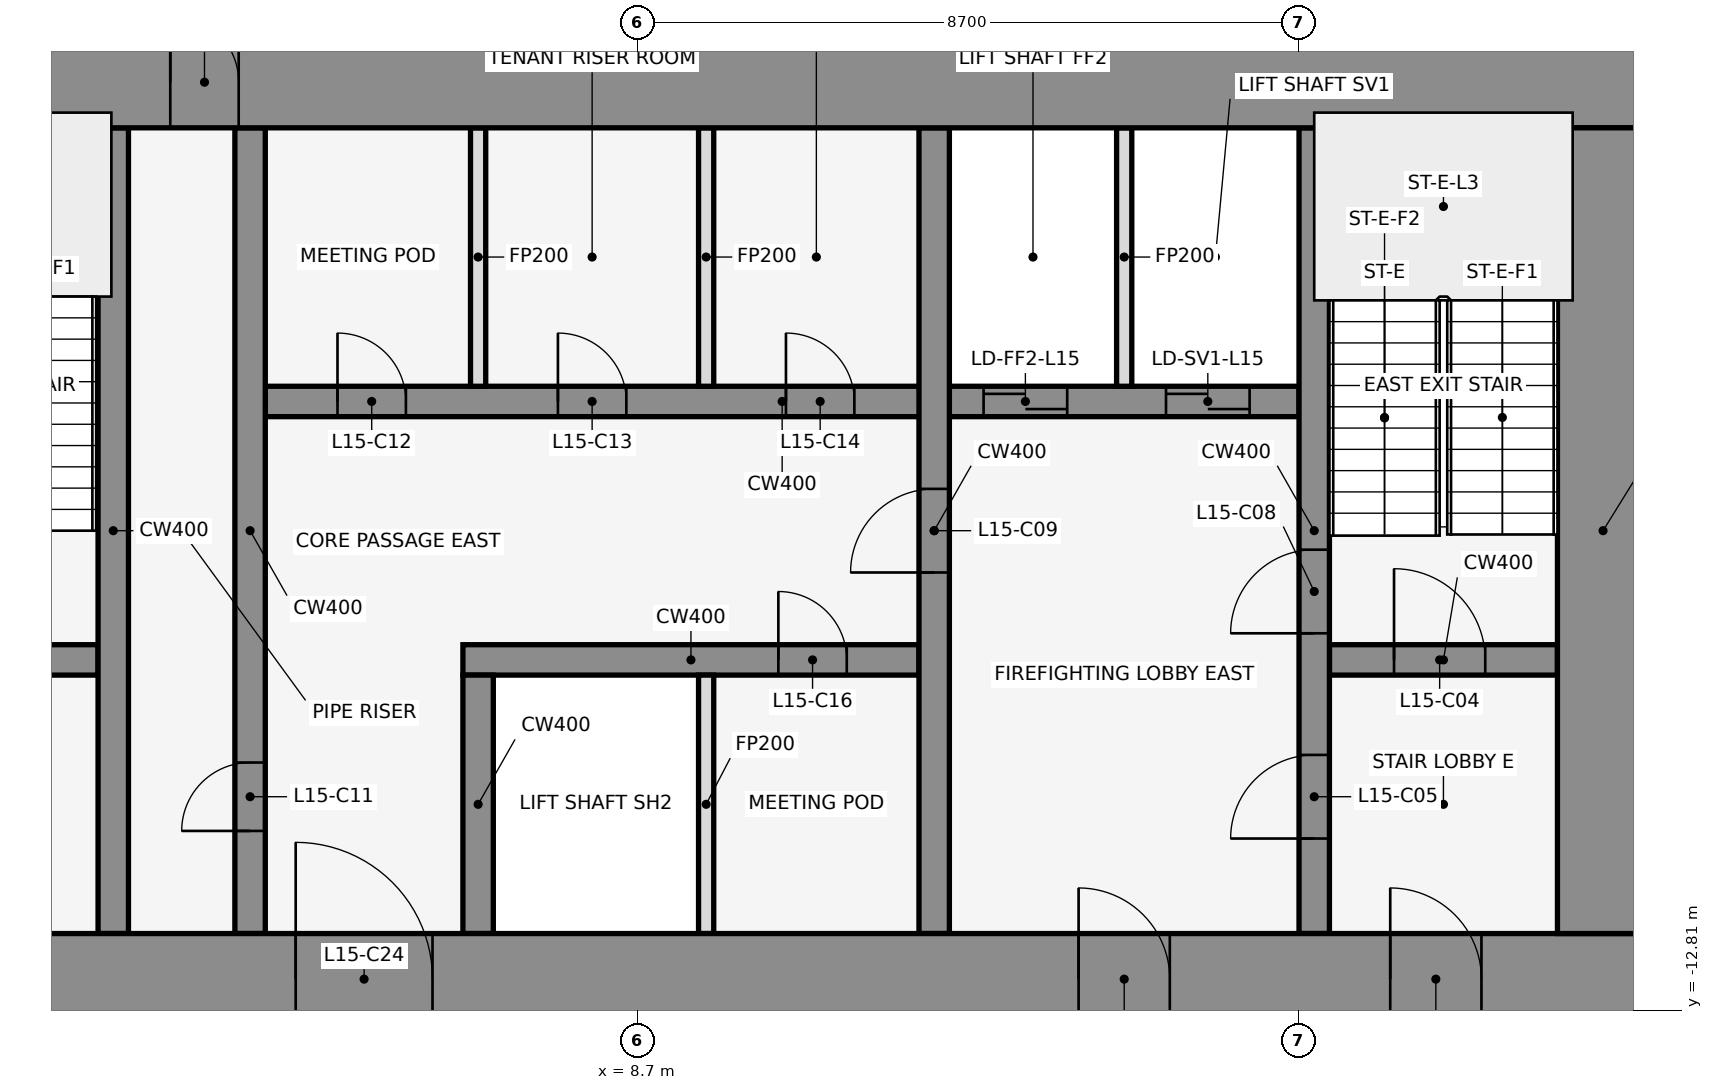
"""IFC4 building model, lengths in metres.
Left out: names, types, materials, properties, quantities, classifications, styles, units other than length and angle.
Written with IfcOpenShell. Run it as: python <this file> out.ifc"""

import sys

from ifc_helpers import new_model, si_unit, direction, frame, frame_2d, origin, place, context, subcontext, project, spatial, rectangle, extrude, element, fill, save


model = new_model("IFC4")
c1 = context("Model", 3, precision=1e-05, world=origin(), true_north=direction((0.0, 1.0)))
c2 = subcontext(c1, "Body", "Model", "MODEL_VIEW")
j1 = project(units=[si_unit("LENGTHUNIT", "METRE"), si_unit("PLANEANGLEUNIT", "RADIAN")], contexts=[c1])
p1 = place(None, origin())
s1 = spatial("IfcSite", under=j1, at=p1, CompositionType="ELEMENT")
p2 = place(p1, origin())
s2 = spatial("IfcBuilding", under=s1, at=p2, CompositionType="ELEMENT")
p3 = place(p2, frame((0.0, 0.0, 75.5)))
s3 = spatial("IfcBuildingStorey", under=s2, at=p3, CompositionType="ELEMENT", Elevation=75.5)
for number, where, z_axis, x_axis in (
    (1, (16.432, -0.105, 0.0), (0.0, 0.0, 1.0), (-0.84, 0.543, 0.0)),
    (2, (1.901, 1.08, 0.0), (0.0, 0.0, 1.0), (-0.84, -0.543, 0.0)),
):
    element("IfcWall", number, at=place(p3, frame(where, z_axis=z_axis, x_axis=x_axis)), inside=s3, PredefinedType="STANDARD", context=c2, shape_type="SweptSolid", body=[
        extrude(rectangle(XDim=2.183, YDim=0.25, at=frame_2d((1.091, 0.0))), origin(), (0.0, 0.0, 1.0), 4.35),
    ])
p4 = place(p3, frame((-1.6, -8.2, 0.0), z_axis=(0.0, 0.0, 1.0), x_axis=(1.0, 0.0, 0.0)))
e3 = element("IfcWall", 3, at=p4, inside=s3, PredefinedType="SHEAR", context=c2, shape_type="SweptSolid", body=[
    extrude(rectangle(XDim=3.2, YDim=0.4, at=frame_2d((1.6, 0.0))), origin(), (0.0, 0.0, 1.0), 4.5),
])
p5 = place(p4, frame((1.05, 0.0, 0.0)))
e4 = element("IfcOpeningElement", 4, at=p5, cuts=e3, PredefinedType="OPENING", context=c2, shape_type="SweptSolid", body=[
    extrude(rectangle(XDim=1.2, YDim=2.1, at=frame_2d((0.6, 1.05))), frame((0.0, 0.212, 0.0), z_axis=(0.0, -1.0, 0.0), x_axis=(1.0, 0.0, 0.0)), (0.0, 0.0, 1.0), 0.424),
])
p6 = place(p3, frame((6.4, -8.2, 0.0), z_axis=(0.0, 0.0, 1.0), x_axis=(1.0, 0.0, 0.0)))
e5 = element("IfcWall", 5, at=p6, inside=s3, PredefinedType="SHEAR", context=c2, shape_type="SweptSolid", body=[
    extrude(rectangle(XDim=6.0, YDim=0.4, at=frame_2d((3.0, 0.0))), origin(), (0.0, 0.0, 1.0), 4.5),
])
p7 = place(p6, frame((4.15, 0.0, 0.0)))
e6 = element("IfcOpeningElement", 6, at=p7, cuts=e5, PredefinedType="OPENING", context=c2, shape_type="SweptSolid", body=[
    extrude(rectangle(XDim=0.9, YDim=2.1, at=frame_2d((0.45, 1.05))), frame((0.0, 0.212, 0.0), z_axis=(0.0, -1.0, 0.0), x_axis=(1.0, 0.0, 0.0)), (0.0, 0.0, 1.0), 0.424),
])
p8 = place(p3, frame((17.8, -8.2, 0.0), z_axis=(0.0, 0.0, 1.0), x_axis=(1.0, 0.0, 0.0)))
e7 = element("IfcWall", 7, at=p8, inside=s3, PredefinedType="SHEAR", context=c2, shape_type="SweptSolid", body=[
    extrude(rectangle(XDim=3.0, YDim=0.4, at=frame_2d((1.5, 0.0))), origin(), (0.0, 0.0, 1.0), 4.5),
])
p9 = place(p8, frame((0.85, 0.0, 0.0)))
e8 = element("IfcOpeningElement", 8, at=p9, cuts=e7, PredefinedType="OPENING", context=c2, shape_type="SweptSolid", body=[
    extrude(rectangle(XDim=1.2, YDim=2.1, at=frame_2d((0.6, 1.05))), frame((0.0, 0.212, 0.0), z_axis=(0.0, -1.0, 0.0), x_axis=(1.0, 0.0, 0.0)), (0.0, 0.0, 1.0), 0.424),
])
p10 = place(p3, frame((3.8, -4.8, 0.0), z_axis=(0.0, 0.0, 1.0), x_axis=(1.0, 0.0, 0.0)))
e9 = element("IfcWall", 9, at=p10, inside=s3, PredefinedType="SHEAR", context=c2, shape_type="SweptSolid", body=[
    extrude(rectangle(XDim=13.6, YDim=0.4, at=frame_2d((6.8, 0.0))), origin(), (0.0, 0.0, 1.0), 4.5),
])
p11 = place(p10, frame((9.45, 0.0, 0.0)))
e10 = element("IfcOpeningElement", 10, at=p11, cuts=e9, PredefinedType="OPENING", context=c2, shape_type="SweptSolid", body=[
    extrude(rectangle(XDim=1.1, YDim=2.1, at=frame_2d((0.55, 1.05))), frame((0.0, 0.212, 0.0), z_axis=(0.0, -1.0, 0.0), x_axis=(1.0, 0.0, 0.0)), (0.0, 0.0, 1.0), 0.424),
])
p12 = place(p10, frame((11.85, 0.0, 0.0)))
e11 = element("IfcOpeningElement", 11, at=p12, cuts=e9, PredefinedType="OPENING", context=c2, shape_type="SweptSolid", body=[
    extrude(rectangle(XDim=1.1, YDim=2.1, at=frame_2d((0.55, 1.05))), frame((0.0, 0.212, 0.0), z_axis=(0.0, -1.0, 0.0), x_axis=(1.0, 0.0, 0.0)), (0.0, 0.0, 1.0), 0.424),
])
p13 = place(p10, frame((0.95, 0.0, 0.0)))
e12 = element("IfcOpeningElement", 12, at=p13, cuts=e9, PredefinedType="OPENING", context=c2, shape_type="SweptSolid", body=[
    extrude(rectangle(XDim=0.9, YDim=2.1, at=frame_2d((0.45, 1.05))), frame((0.0, 0.212, 0.0), z_axis=(0.0, -1.0, 0.0), x_axis=(1.0, 0.0, 0.0)), (0.0, 0.0, 1.0), 0.424),
])
p14 = place(p10, frame((3.85, 0.0, 0.0)))
e13 = element("IfcOpeningElement", 13, at=p14, cuts=e9, PredefinedType="OPENING", context=c2, shape_type="SweptSolid", body=[
    extrude(rectangle(XDim=0.9, YDim=2.1, at=frame_2d((0.45, 1.05))), frame((0.0, 0.212, 0.0), z_axis=(0.0, -1.0, 0.0), x_axis=(1.0, 0.0, 0.0)), (0.0, 0.0, 1.0), 0.424),
])
p15 = place(p10, frame((6.85, 0.0, 0.0)))
e14 = element("IfcOpeningElement", 14, at=p15, cuts=e9, PredefinedType="OPENING", context=c2, shape_type="SweptSolid", body=[
    extrude(rectangle(XDim=0.9, YDim=2.1, at=frame_2d((0.45, 1.05))), frame((0.0, 0.212, 0.0), z_axis=(0.0, -1.0, 0.0), x_axis=(1.0, 0.0, 0.0)), (0.0, 0.0, 1.0), 0.424),
])
p16 = place(p3, frame((1.8, -11.8, 0.0), z_axis=(0.0, 0.0, 1.0), x_axis=(0.0, 1.0, 0.0)))
e15 = element("IfcWall", 15, at=p16, inside=s3, PredefinedType="SHEAR", context=c2, shape_type="SweptSolid", body=[
    extrude(rectangle(XDim=10.6, YDim=0.4, at=frame_2d((5.3, 0.0))), origin(), (0.0, 0.0, 1.0), 4.5),
])
p17 = place(p3, frame((3.6, -11.8, 0.0), z_axis=(0.0, 0.0, 1.0), x_axis=(0.0, 1.0, 0.0)))
e16 = element("IfcWall", 16, at=p17, inside=s3, PredefinedType="SHEAR", context=c2, shape_type="SweptSolid", body=[
    extrude(rectangle(XDim=10.6, YDim=0.4, at=frame_2d((5.3, 0.0))), origin(), (0.0, 0.0, 1.0), 4.5),
])
p18 = place(p17, frame((1.35, 0.0, 0.0)))
e17 = element("IfcOpeningElement", 17, at=p18, cuts=e16, PredefinedType="OPENING", context=c2, shape_type="SweptSolid", body=[
    extrude(rectangle(XDim=0.9, YDim=2.1, at=frame_2d((0.45, 1.05))), frame((0.0, 0.212, 0.0), z_axis=(0.0, -1.0, 0.0), x_axis=(1.0, 0.0, 0.0)), (0.0, 0.0, 1.0), 0.424),
])
p19 = place(p3, frame((6.6, -11.8, 0.0), z_axis=(0.0, 0.0, 1.0), x_axis=(0.0, 1.0, 0.0)))
e18 = element("IfcWall", 18, at=p19, inside=s3, PredefinedType="SHEAR", context=c2, shape_type="SweptSolid", body=[
    extrude(rectangle(XDim=3.4, YDim=0.4, at=frame_2d((1.7, 0.0))), origin(), (0.0, 0.0, 1.0), 4.5),
])
for number, where, z_axis, x_axis in (
    (19, (6.6, -4.6, 0.0), (0.0, 0.0, 1.0), (0.0, 1.0, 0.0)),
    (20, (9.6, -11.8, 0.0), (0.0, 0.0, 1.0), (0.0, 1.0, 0.0)),
    (21, (9.6, -4.6, 0.0), (0.0, 0.0, 1.0), (0.0, 1.0, 0.0)),
):
    element("IfcWall", number, at=place(p3, frame(where, z_axis=z_axis, x_axis=x_axis)), inside=s3, PredefinedType="PARTITIONING", context=c2, shape_type="SweptSolid", body=[
        extrude(rectangle(XDim=3.4, YDim=0.2, at=frame_2d((1.7, 0.0))), origin(), (0.0, 0.0, 1.0), 3.339),
    ])
p20 = place(p3, frame((12.6, -11.8, 0.0), z_axis=(0.0, 0.0, 1.0), x_axis=(0.0, 1.0, 0.0)))
e22 = element("IfcWall", 22, at=p20, inside=s3, PredefinedType="SHEAR", context=c2, shape_type="SweptSolid", body=[
    extrude(rectangle(XDim=10.6, YDim=0.4, at=frame_2d((5.3, 0.0))), origin(), (0.0, 0.0, 1.0), 4.5),
])
p21 = place(p20, frame((4.75, 0.0, 0.0)))
e23 = element("IfcOpeningElement", 23, at=p21, cuts=e22, PredefinedType="OPENING", context=c2, shape_type="SweptSolid", body=[
    extrude(rectangle(XDim=1.1, YDim=2.1, at=frame_2d((0.55, 1.05))), frame((0.0, 0.212, 0.0), z_axis=(0.0, -1.0, 0.0), x_axis=(1.0, 0.0, 0.0)), (0.0, 0.0, 1.0), 0.424),
])
p22 = place(p3, frame((15.1, -4.6, 0.0), z_axis=(0.0, 0.0, 1.0), x_axis=(0.0, 1.0, 0.0)))
e24 = element("IfcWall", 24, at=p22, inside=s3, PredefinedType="PARTITIONING", context=c2, shape_type="SweptSolid", body=[
    extrude(rectangle(XDim=3.4, YDim=0.2, at=frame_2d((1.7, 0.0))), origin(), (0.0, 0.0, 1.0), 3.339),
])
p23 = place(p3, frame((17.6, -11.8, 0.0), z_axis=(0.0, 0.0, 1.0), x_axis=(0.0, 1.0, 0.0)))
e25 = element("IfcWall", 25, at=p23, inside=s3, PredefinedType="SHEAR", context=c2, shape_type="SweptSolid", body=[
    extrude(rectangle(XDim=10.6, YDim=0.4, at=frame_2d((5.3, 0.0))), origin(), (0.0, 0.0, 1.0), 4.5),
])
p24 = place(p23, frame((1.25, 0.0, 0.0)))
e26 = element("IfcOpeningElement", 26, at=p24, cuts=e25, PredefinedType="OPENING", context=c2, shape_type="SweptSolid", body=[
    extrude(rectangle(XDim=1.1, YDim=2.1, at=frame_2d((0.55, 1.05))), frame((0.0, 0.212, 0.0), z_axis=(0.0, -1.0, 0.0), x_axis=(1.0, 0.0, 0.0)), (0.0, 0.0, 1.0), 0.424),
])
p25 = place(p23, frame((3.95, 0.0, 0.0)))
e27 = element("IfcOpeningElement", 27, at=p25, cuts=e25, PredefinedType="OPENING", context=c2, shape_type="SweptSolid", body=[
    extrude(rectangle(XDim=1.1, YDim=2.1, at=frame_2d((0.55, 1.05))), frame((0.0, 0.212, 0.0), z_axis=(0.0, -1.0, 0.0), x_axis=(1.0, 0.0, 0.0)), (0.0, 0.0, 1.0), 0.424),
])
p26 = place(p3, frame((-22.0, -0.6, 0.0), z_axis=(0.0, 0.0, 1.0), x_axis=(1.0, 0.0, 0.0)))
e28 = element("IfcWall", 28, at=p26, inside=s3, PredefinedType="SHEAR", context=c2, shape_type="SweptSolid", body=[
    extrude(rectangle(XDim=44.0, YDim=1.2, at=frame_2d((22.0, 0.0))), origin(), (0.0, 0.0, 1.0), 4.5),
])
p27 = place(p26, frame((18.55, 0.0, 0.0)))
e29 = element("IfcOpeningElement", 29, at=p27, cuts=e28, PredefinedType="OPENING", context=c2, shape_type="SweptSolid", body=[
    extrude(rectangle(XDim=0.9, YDim=2.1, at=frame_2d((0.45, 1.05))), frame((0.0, 0.612, 0.0), z_axis=(0.0, -1.0, 0.0), x_axis=(1.0, 0.0, 0.0)), (0.0, 0.0, 1.0), 1.224),
])
p28 = place(p26, frame((24.55, 0.0, 0.0)))
e30 = element("IfcOpeningElement", 30, at=p28, cuts=e28, PredefinedType="OPENING", context=c2, shape_type="SweptSolid", body=[
    extrude(rectangle(XDim=0.9, YDim=2.1, at=frame_2d((0.45, 1.05))), frame((0.0, 0.612, 0.0), z_axis=(0.0, -1.0, 0.0), x_axis=(1.0, 0.0, 0.0)), (0.0, 0.0, 1.0), 1.224),
])
p29 = place(p3, frame((-22.0, -12.4, 0.0), z_axis=(0.0, 0.0, 1.0), x_axis=(1.0, 0.0, 0.0)))
e31 = element("IfcWall", 31, at=p29, inside=s3, PredefinedType="SHEAR", context=c2, shape_type="SweptSolid", body=[
    extrude(rectangle(XDim=44.0, YDim=1.2, at=frame_2d((22.0, 0.0))), origin(), (0.0, 0.0, 1.0), 4.5),
])
p30 = place(p29, frame((2.2, 0.0, 0.0)))
e32 = element("IfcOpeningElement", 32, at=p30, cuts=e31, PredefinedType="OPENING", context=c2, shape_type="SweptSolid", body=[
    extrude(rectangle(XDim=1.2, YDim=2.1, at=frame_2d((0.6, 1.05))), frame((0.0, 0.612, 0.0), z_axis=(0.0, -1.0, 0.0), x_axis=(1.0, 0.0, 0.0)), (0.0, 0.0, 1.0), 1.224),
])
p31 = place(p29, frame((21.4, 0.0, 0.0)))
e33 = element("IfcOpeningElement", 33, at=p31, cuts=e31, PredefinedType="OPENING", context=c2, shape_type="SweptSolid", body=[
    extrude(rectangle(XDim=1.2, YDim=2.1, at=frame_2d((0.6, 1.05))), frame((0.0, 0.612, 0.0), z_axis=(0.0, -1.0, 0.0), x_axis=(1.0, 0.0, 0.0)), (0.0, 0.0, 1.0), 1.224),
])
p32 = place(p29, frame((40.6, 0.0, 0.0)))
e34 = element("IfcOpeningElement", 34, at=p32, cuts=e31, PredefinedType="OPENING", context=c2, shape_type="SweptSolid", body=[
    extrude(rectangle(XDim=1.2, YDim=2.1, at=frame_2d((0.6, 1.05))), frame((0.0, 0.612, 0.0), z_axis=(0.0, -1.0, 0.0), x_axis=(1.0, 0.0, 0.0)), (0.0, 0.0, 1.0), 1.224),
])
p33 = place(p29, frame((16.0, 0.0, 0.0)))
e35 = element("IfcOpeningElement", 35, at=p33, cuts=e31, PredefinedType="OPENING", context=c2, shape_type="SweptSolid", body=[
    extrude(rectangle(XDim=1.8, YDim=2.1, at=frame_2d((0.9, 1.05))), frame((0.0, 0.612, 0.0), z_axis=(0.0, -1.0, 0.0), x_axis=(1.0, 0.0, 0.0)), (0.0, 0.0, 1.0), 1.224),
])
p34 = place(p29, frame((6.3, 0.0, 0.0)))
e36 = element("IfcOpeningElement", 36, at=p34, cuts=e31, PredefinedType="OPENING", context=c2, shape_type="SweptSolid", body=[
    extrude(rectangle(XDim=1.2, YDim=2.1, at=frame_2d((0.6, 1.05))), frame((0.0, 0.612, 0.0), z_axis=(0.0, -1.0, 0.0), x_axis=(1.0, 0.0, 0.0)), (0.0, 0.0, 1.0), 1.224),
])
p35 = place(p29, frame((26.2, 0.0, 0.0)))
e37 = element("IfcOpeningElement", 37, at=p35, cuts=e31, PredefinedType="OPENING", context=c2, shape_type="SweptSolid", body=[
    extrude(rectangle(XDim=1.8, YDim=2.1, at=frame_2d((0.9, 1.05))), frame((0.0, 0.612, 0.0), z_axis=(0.0, -1.0, 0.0), x_axis=(1.0, 0.0, 0.0)), (0.0, 0.0, 1.0), 1.224),
])
p36 = place(p29, frame((36.5, 0.0, 0.0)))
e38 = element("IfcOpeningElement", 38, at=p36, cuts=e31, PredefinedType="OPENING", context=c2, shape_type="SweptSolid", body=[
    extrude(rectangle(XDim=1.2, YDim=2.1, at=frame_2d((0.6, 1.05))), frame((0.0, 0.612, 0.0), z_axis=(0.0, -1.0, 0.0), x_axis=(1.0, 0.0, 0.0)), (0.0, 0.0, 1.0), 1.224),
])
p37 = place(p3, frame((21.4, -11.8, 0.0), z_axis=(0.0, 0.0, 1.0), x_axis=(0.0, 1.0, 0.0)))
e39 = element("IfcWall", 39, at=p37, inside=s3, PredefinedType="SHEAR", context=c2, shape_type="SweptSolid", body=[
    extrude(rectangle(XDim=10.6, YDim=1.2, at=frame_2d((5.3, 0.0))), origin(), (0.0, 0.0, 1.0), 4.5),
])
p38 = place(p9, origin())
e40 = element("IfcDoor", 40, at=p38, inside=s3, OperationType="SINGLE_SWING_RIGHT", PredefinedType="DOOR", context=c2, shape_type="SweptSolid", body=[
    extrude(rectangle(XDim=1.2, YDim=2.1, at=frame_2d((0.6, 1.05))), frame((0.0, 0.025, 0.0), z_axis=(0.0, -1.0, 0.0), x_axis=(1.0, 0.0, 0.0)), (0.0, 0.0, 1.0), 0.05),
])
fill(e8, e40)
p39 = place(p24, origin())
e41 = element("IfcDoor", 41, at=p39, inside=s3, OperationType="SINGLE_SWING_LEFT", PredefinedType="DOOR", context=c2, shape_type="SweptSolid", body=[
    extrude(rectangle(XDim=1.1, YDim=2.1, at=frame_2d((0.55, 1.05))), frame((0.0, 0.025, 0.0), z_axis=(0.0, -1.0, 0.0), x_axis=(1.0, 0.0, 0.0)), (0.0, 0.0, 1.0), 0.05),
])
fill(e26, e41)
p40 = place(p11, origin())
e42 = element("IfcDoor", 42, at=p40, inside=s3, OperationType="DOUBLE_DOOR_SLIDING", PredefinedType="DOOR", context=c2, shape_type="SweptSolid", body=[
    extrude(rectangle(XDim=1.1, YDim=2.1, at=frame_2d((0.55, 1.05))), frame((0.0, 0.025, 0.0), z_axis=(0.0, -1.0, 0.0), x_axis=(1.0, 0.0, 0.0)), (0.0, 0.0, 1.0), 0.05),
])
fill(e10, e42)
p41 = place(p12, origin())
e43 = element("IfcDoor", 43, at=p41, inside=s3, OperationType="DOUBLE_DOOR_SLIDING", PredefinedType="DOOR", context=c2, shape_type="SweptSolid", body=[
    extrude(rectangle(XDim=1.1, YDim=2.1, at=frame_2d((0.55, 1.05))), frame((0.0, 0.025, 0.0), z_axis=(0.0, -1.0, 0.0), x_axis=(1.0, 0.0, 0.0)), (0.0, 0.0, 1.0), 0.05),
])
fill(e11, e43)
p42 = place(p25, origin())
e44 = element("IfcDoor", 44, at=p42, inside=s3, OperationType="SINGLE_SWING_RIGHT", PredefinedType="DOOR", context=c2, shape_type="SweptSolid", body=[
    extrude(rectangle(XDim=1.1, YDim=2.1, at=frame_2d((0.55, 1.05))), frame((0.0, 0.025, 0.0), z_axis=(0.0, -1.0, 0.0), x_axis=(1.0, 0.0, 0.0)), (0.0, 0.0, 1.0), 0.05),
])
fill(e27, e44)
p43 = place(p21, frame((1.1, 0.0, 0.0), z_axis=(0.0, 0.0, 1.0), x_axis=(-1.0, 0.0, 0.0)))
e45 = element("IfcDoor", 45, at=p43, inside=s3, OperationType="SINGLE_SWING_RIGHT", PredefinedType="DOOR", context=c2, shape_type="SweptSolid", body=[
    extrude(rectangle(XDim=1.1, YDim=2.1, at=frame_2d((0.55, 1.05))), frame((0.0, 0.025, 0.0), z_axis=(0.0, -1.0, 0.0), x_axis=(1.0, 0.0, 0.0)), (0.0, 0.0, 1.0), 0.05),
])
fill(e23, e45)
p44 = place(p18, origin())
e46 = element("IfcDoor", 46, at=p44, inside=s3, OperationType="SINGLE_SWING_LEFT", PredefinedType="DOOR", context=c2, shape_type="SweptSolid", body=[
    extrude(rectangle(XDim=0.9, YDim=2.1, at=frame_2d((0.45, 1.05))), frame((0.0, 0.025, 0.0), z_axis=(0.0, -1.0, 0.0), x_axis=(1.0, 0.0, 0.0)), (0.0, 0.0, 1.0), 0.05),
])
fill(e17, e46)
p45 = place(p13, origin())
e47 = element("IfcDoor", 47, at=p45, inside=s3, OperationType="SINGLE_SWING_RIGHT", PredefinedType="DOOR", context=c2, shape_type="SweptSolid", body=[
    extrude(rectangle(XDim=0.9, YDim=2.1, at=frame_2d((0.45, 1.05))), frame((0.0, 0.025, 0.0), z_axis=(0.0, -1.0, 0.0), x_axis=(1.0, 0.0, 0.0)), (0.0, 0.0, 1.0), 0.05),
])
fill(e12, e47)
p46 = place(p14, origin())
e48 = element("IfcDoor", 48, at=p46, inside=s3, OperationType="SINGLE_SWING_LEFT", PredefinedType="DOOR", context=c2, shape_type="SweptSolid", body=[
    extrude(rectangle(XDim=0.9, YDim=2.1, at=frame_2d((0.45, 1.05))), frame((0.0, 0.025, 0.0), z_axis=(0.0, -1.0, 0.0), x_axis=(1.0, 0.0, 0.0)), (0.0, 0.0, 1.0), 0.05),
])
fill(e13, e48)
p47 = place(p15, origin())
e49 = element("IfcDoor", 49, at=p47, inside=s3, OperationType="SINGLE_SWING_RIGHT", PredefinedType="DOOR", context=c2, shape_type="SweptSolid", body=[
    extrude(rectangle(XDim=0.9, YDim=2.1, at=frame_2d((0.45, 1.05))), frame((0.0, 0.025, 0.0), z_axis=(0.0, -1.0, 0.0), x_axis=(1.0, 0.0, 0.0)), (0.0, 0.0, 1.0), 0.05),
])
fill(e14, e49)
p48 = place(p7, frame((0.9, 0.0, 0.0), z_axis=(0.0, 0.0, 1.0), x_axis=(-1.0, 0.0, 0.0)))
e50 = element("IfcDoor", 50, at=p48, inside=s3, OperationType="SINGLE_SWING_LEFT", PredefinedType="DOOR", context=c2, shape_type="SweptSolid", body=[
    extrude(rectangle(XDim=0.9, YDim=2.1, at=frame_2d((0.45, 1.05))), frame((0.0, 0.025, 0.0), z_axis=(0.0, -1.0, 0.0), x_axis=(1.0, 0.0, 0.0)), (0.0, 0.0, 1.0), 0.05),
])
fill(e6, e50)
p49 = place(p28, origin())
e51 = element("IfcDoor", 51, at=p49, inside=s3, OperationType="SINGLE_SWING_LEFT", PredefinedType="DOOR", context=c2, shape_type="SweptSolid", body=[
    extrude(rectangle(XDim=0.9, YDim=2.1, at=frame_2d((0.45, 1.05))), frame((0.0, 0.025, 0.0), z_axis=(0.0, -1.0, 0.0), x_axis=(1.0, 0.0, 0.0)), (0.0, 0.0, 1.0), 0.05),
])
fill(e30, e51)
p50 = place(p32, frame((1.2, 0.0, 0.0), z_axis=(0.0, 0.0, 1.0), x_axis=(-1.0, 0.0, 0.0)))
e52 = element("IfcDoor", 52, at=p50, inside=s3, OperationType="SINGLE_SWING_RIGHT", PredefinedType="DOOR", context=c2, shape_type="SweptSolid", body=[
    extrude(rectangle(XDim=1.2, YDim=2.1, at=frame_2d((0.6, 1.05))), frame((0.0, 0.025, 0.0), z_axis=(0.0, -1.0, 0.0), x_axis=(1.0, 0.0, 0.0)), (0.0, 0.0, 1.0), 0.05),
])
fill(e34, e52)
p51 = place(p35, origin())
e53 = element("IfcDoor", 53, at=p51, inside=s3, OperationType="SINGLE_SWING_LEFT", PredefinedType="DOOR", context=c2, shape_type="SweptSolid", body=[
    extrude(rectangle(XDim=1.8, YDim=2.1, at=frame_2d((0.9, 1.05))), frame((0.0, 0.025, 0.0), z_axis=(0.0, -1.0, 0.0), x_axis=(1.0, 0.0, 0.0)), (0.0, 0.0, 1.0), 0.05),
])
fill(e37, e53)
p52 = place(p36, frame((1.2, 0.0, 0.0), z_axis=(0.0, 0.0, 1.0), x_axis=(-1.0, 0.0, 0.0)))
e54 = element("IfcDoor", 54, at=p52, inside=s3, OperationType="SINGLE_SWING_RIGHT", PredefinedType="DOOR", context=c2, shape_type="SweptSolid", body=[
    extrude(rectangle(XDim=1.2, YDim=2.1, at=frame_2d((0.6, 1.05))), frame((0.0, 0.025, 0.0), z_axis=(0.0, -1.0, 0.0), x_axis=(1.0, 0.0, 0.0)), (0.0, 0.0, 1.0), 0.05),
])
fill(e38, e54)
save(model, sys.argv[1])
